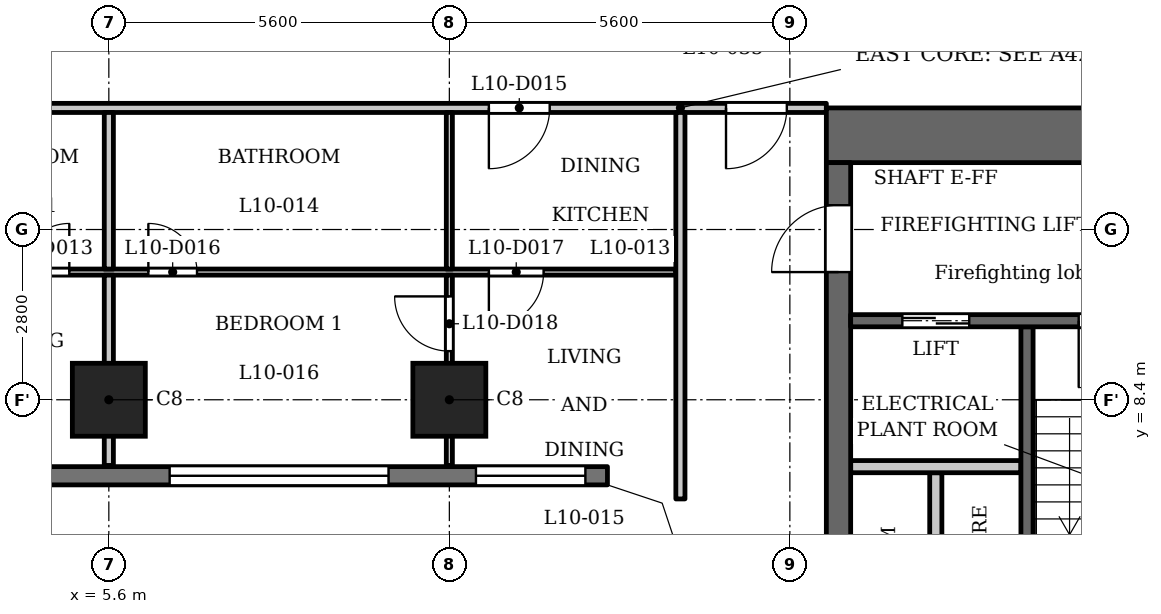
"""IFC4 building model, lengths in metres.
Left out: names, types, materials, properties, quantities, classifications, styles, units other than length and angle.
Written with IfcOpenShell. Run it as: python <this file> out.ifc"""

import sys

from ifc_helpers import new_model, si_unit, direction, frame, frame_2d, origin, origin_2d, place, context, subcontext, project, spatial, polyline, rectangle, outline, extrude, element, fill, save


model = new_model("IFC4")
c1 = context("Model", 3, precision=1e-05, world=origin(), true_north=direction((0.0, 1.0)))
c2 = subcontext(c1, "Body", "Model", "MODEL_VIEW")
j1 = project(units=[si_unit("LENGTHUNIT", "METRE"), si_unit("PLANEANGLEUNIT", "RADIAN")], contexts=[c1])
p1 = place(None, origin())
s1 = spatial("IfcSite", under=j1, at=p1, CompositionType="ELEMENT")
p2 = place(p1, origin())
s2 = spatial("IfcBuilding", under=s1, at=p2, CompositionType="ELEMENT")
p3 = place(p2, frame((0.0, 0.0, 44.5)))
s3 = spatial("IfcBuildingStorey", under=s2, at=p3, CompositionType="ELEMENT", Elevation=44.5)
for number, where, z_axis, x_axis in (
    (1, (5.6, 8.4, 0.0), (0.0, 0.0, 1.0), (1.0, 0.0, 0.0)),
    (2, (11.2, 8.4, 0.0), (0.0, 0.0, 1.0), (1.0, 0.0, 0.0)),
):
    element("IfcColumn", number, at=place(p3, frame(where, z_axis=z_axis, x_axis=x_axis)), inside=s3, PredefinedType="COLUMN", context=c2, shape_type="SweptSolid", body=[
        extrude(rectangle(XDim=1.2, YDim=1.2, at=origin_2d()), origin(), (0.0, 0.0, 1.0), 3.5),
    ])
p4 = place(p3, frame((-13.8, 7.15, 0.0), z_axis=(0.0, 0.0, 1.0), x_axis=(1.0, 0.0, 0.0)))
e3 = element("IfcWall", 3, at=p4, inside=s3, PredefinedType="SOLIDWALL", context=c2, shape_type="SweptSolid", body=[
    extrude(rectangle(XDim=27.6, YDim=0.3, at=frame_2d((13.8, 0.0))), origin(), (0.0, 0.0, 1.0), 3.2),
])
p5 = place(p4, frame((0.363, 0.0, 0.9)))
e4 = element("IfcOpeningElement", 4, at=p5, cuts=e3, PredefinedType="OPENING", context=c2, shape_type="SweptSolid", body=[
    extrude(rectangle(XDim=1.8, YDim=1.25, at=frame_2d((0.9, 0.625))), frame((0.0, 0.16, 0.0), z_axis=(0.0, -1.0, 0.0), x_axis=(1.0, 0.0, 0.0)), (0.0, 0.0, 1.0), 0.32),
])
p6 = place(p4, frame((3.6, 0.0, 1.2)))
e5 = element("IfcOpeningElement", 5, at=p6, cuts=e3, PredefinedType="OPENING", context=c2, shape_type="SweptSolid", body=[
    extrude(rectangle(XDim=3.6, YDim=0.95, at=frame_2d((1.8, 0.475))), frame((0.0, 0.16, 0.0), z_axis=(0.0, -1.0, 0.0), x_axis=(1.0, 0.0, 0.0)), (0.0, 0.0, 1.0), 0.32),
])
p7 = place(p4, frame((9.2, 0.0, 1.2)))
e6 = element("IfcOpeningElement", 6, at=p7, cuts=e3, PredefinedType="OPENING", context=c2, shape_type="SweptSolid", body=[
    extrude(rectangle(XDim=3.6, YDim=0.95, at=frame_2d((1.8, 0.475))), frame((0.0, 0.16, 0.0), z_axis=(0.0, -1.0, 0.0), x_axis=(1.0, 0.0, 0.0)), (0.0, 0.0, 1.0), 0.32),
])
p8 = place(p4, frame((14.8, 0.0, 1.2)))
e7 = element("IfcOpeningElement", 7, at=p8, cuts=e3, PredefinedType="OPENING", context=c2, shape_type="SweptSolid", body=[
    extrude(rectangle(XDim=3.6, YDim=0.95, at=frame_2d((1.8, 0.475))), frame((0.0, 0.16, 0.0), z_axis=(0.0, -1.0, 0.0), x_axis=(1.0, 0.0, 0.0)), (0.0, 0.0, 1.0), 0.32),
])
p9 = place(p4, frame((20.4, 0.0, 1.2)))
e8 = element("IfcOpeningElement", 8, at=p9, cuts=e3, PredefinedType="OPENING", context=c2, shape_type="SweptSolid", body=[
    extrude(rectangle(XDim=3.6, YDim=0.95, at=frame_2d((1.8, 0.475))), frame((0.0, 0.16, 0.0), z_axis=(0.0, -1.0, 0.0), x_axis=(1.0, 0.0, 0.0)), (0.0, 0.0, 1.0), 0.32),
])
p10 = place(p4, frame((25.438, 0.0, 0.9)))
e9 = element("IfcOpeningElement", 9, at=p10, cuts=e3, PredefinedType="OPENING", context=c2, shape_type="SweptSolid", body=[
    extrude(rectangle(XDim=1.8, YDim=1.25, at=frame_2d((0.9, 0.625))), frame((0.0, 0.16, 0.0), z_axis=(0.0, -1.0, 0.0), x_axis=(1.0, 0.0, 0.0)), (0.0, 0.0, 1.0), 0.32),
])
p11 = place(p3, frame((20.7, 2.6, 0.0), z_axis=(0.0, 0.0, 1.0), x_axis=(0.0, 1.0, 0.0)))
e10 = element("IfcWall", 10, at=p11, inside=s3, PredefinedType="SHEAR", context=c2, shape_type="SweptSolid", body=[
    extrude(rectangle(XDim=7.0, YDim=0.2, at=frame_2d((3.5, 0.0))), origin(), (0.0, 0.0, 1.0), 3.2),
])
p12 = place(p3, frame((17.4, 12.75, 0.0), z_axis=(0.0, 0.0, 1.0), x_axis=(1.0, 0.0, 0.0)))
e11 = element("IfcWall", 11, at=p12, inside=s3, PredefinedType="SHEAR", context=c2, shape_type="SweptSolid", body=[
    extrude(rectangle(XDim=10.4, YDim=0.9, at=frame_2d((5.2, 0.0))), origin(), (0.0, 0.0, 1.0), 3.2),
])
p13 = place(p3, frame((19.2, 2.6, 0.0), z_axis=(0.0, 0.0, 1.0), x_axis=(0.0, 1.0, 0.0)))
e12 = element("IfcWall", 12, at=p13, inside=s3, PredefinedType="PARTITIONING", context=c2, shape_type="SweptSolid", body=[
    extrude(rectangle(XDim=4.6, YDim=0.2, at=frame_2d((2.3, 0.0))), origin(), (0.0, 0.0, 1.0), 3.2),
])
p14 = place(p3, frame((17.6, -12.3, 0.0), z_axis=(0.0, 0.0, 1.0), x_axis=(0.0, 1.0, 0.0)))
e13 = element("IfcWall", 13, at=p14, inside=s3, PredefinedType="SHEAR", context=c2, shape_type="SweptSolid", body=[
    extrude(rectangle(XDim=24.6, YDim=0.4, at=frame_2d((12.3, 0.0))), origin(), (0.0, 0.0, 1.0), 3.2),
])
p15 = place(p14, frame((6.0, 0.0, 0.0)))
e14 = element("IfcOpeningElement", 14, at=p15, cuts=e13, PredefinedType="OPENING", context=c2, shape_type="SweptSolid", body=[
    extrude(rectangle(XDim=1.1, YDim=2.1, at=frame_2d((0.55, 1.05))), frame((0.0, 0.21, 0.0), z_axis=(0.0, -1.0, 0.0), x_axis=(1.0, 0.0, 0.0)), (0.0, 0.0, 1.0), 0.42),
])
p16 = place(p14, frame((8.4, 0.0, 0.0)))
e15 = element("IfcOpeningElement", 15, at=p16, cuts=e13, PredefinedType="OPENING", context=c2, shape_type="SweptSolid", body=[
    extrude(rectangle(XDim=1.1, YDim=2.1, at=frame_2d((0.55, 1.05))), frame((0.0, 0.21, 0.0), z_axis=(0.0, -1.0, 0.0), x_axis=(1.0, 0.0, 0.0)), (0.0, 0.0, 1.0), 0.42),
])
p17 = place(p14, frame((10.8, 0.0, 0.0)))
e16 = element("IfcOpeningElement", 16, at=p17, cuts=e13, PredefinedType="OPENING", context=c2, shape_type="SweptSolid", body=[
    extrude(rectangle(XDim=1.1, YDim=2.1, at=frame_2d((0.55, 1.05))), frame((0.0, 0.21, 0.0), z_axis=(0.0, -1.0, 0.0), x_axis=(1.0, 0.0, 0.0)), (0.0, 0.0, 1.0), 0.42),
])
p18 = place(p14, frame((16.75, 0.0, 0.0)))
e17 = element("IfcOpeningElement", 17, at=p18, cuts=e13, PredefinedType="OPENING", context=c2, shape_type="SweptSolid", body=[
    extrude(rectangle(XDim=0.9, YDim=2.1, at=frame_2d((0.45, 1.05))), frame((0.0, 0.21, 0.0), z_axis=(0.0, -1.0, 0.0), x_axis=(1.0, 0.0, 0.0)), (0.0, 0.0, 1.0), 0.42),
])
p19 = place(p14, frame((22.8, 0.0, 0.0)))
e18 = element("IfcOpeningElement", 18, at=p19, cuts=e13, PredefinedType="OPENING", context=c2, shape_type="SweptSolid", body=[
    extrude(rectangle(XDim=1.1, YDim=2.1, at=frame_2d((0.55, 1.05))), frame((0.0, 0.21, 0.0), z_axis=(0.0, -1.0, 0.0), x_axis=(1.0, 0.0, 0.0)), (0.0, 0.0, 1.0), 0.42),
])
p20 = place(p14, frame((0.7, 0.0, 0.0)))
e19 = element("IfcOpeningElement", 19, at=p20, cuts=e13, PredefinedType="OPENING", context=c2, shape_type="SweptSolid", body=[
    extrude(rectangle(XDim=1.1, YDim=2.1, at=frame_2d((0.55, 1.05))), frame((0.0, 0.21, 0.0), z_axis=(0.0, -1.0, 0.0), x_axis=(1.0, 0.0, 0.0)), (0.0, 0.0, 1.0), 0.42),
])
p21 = place(p14, frame((12.775, 0.0, 0.0)))
e20 = element("IfcOpeningElement", 20, at=p21, cuts=e13, PredefinedType="OPENING", context=c2, shape_type="SweptSolid", body=[
    extrude(rectangle(XDim=1.8, YDim=2.1, at=frame_2d((0.9, 1.05))), frame((0.0, 0.21, 0.0), z_axis=(0.0, -1.0, 0.0), x_axis=(1.0, 0.0, 0.0)), (0.0, 0.0, 1.0), 0.42),
])
p22 = place(p3, frame((17.8, 7.3, 0.0), z_axis=(0.0, 0.0, 1.0), x_axis=(1.0, 0.0, 0.0)))
e21 = element("IfcWall", 21, at=p22, inside=s3, PredefinedType="PARTITIONING", context=c2, shape_type="SweptSolid", body=[
    extrude(rectangle(XDim=2.8, YDim=0.2, at=frame_2d((1.4, 0.0))), origin(), (0.0, 0.0, 1.0), 3.2),
])
p23 = place(p3, frame((17.8, 9.7, 0.0), z_axis=(0.0, 0.0, 1.0), x_axis=(1.0, 0.0, 0.0)))
e22 = element("IfcWall", 22, at=p23, inside=s3, PredefinedType="SHEAR", context=c2, shape_type="SweptSolid", body=[
    extrude(rectangle(XDim=8.3, YDim=0.2, at=frame_2d((4.15, 0.0))), origin(), (0.0, 0.0, 1.0), 3.2),
])
p24 = place(p23, frame((0.85, 0.0, 0.0)))
e23 = element("IfcOpeningElement", 23, at=p24, cuts=e22, PredefinedType="OPENING", context=c2, shape_type="SweptSolid", body=[
    extrude(rectangle(XDim=1.1, YDim=2.1, at=frame_2d((0.55, 1.05))), frame((0.0, 0.11, 0.0), z_axis=(0.0, -1.0, 0.0), x_axis=(1.0, 0.0, 0.0)), (0.0, 0.0, 1.0), 0.22),
])
p25 = place(p23, frame((3.75, 0.0, 0.0)))
e24 = element("IfcOpeningElement", 24, at=p25, cuts=e22, PredefinedType="OPENING", context=c2, shape_type="SweptSolid", body=[
    extrude(rectangle(XDim=1.1, YDim=2.1, at=frame_2d((0.55, 1.05))), frame((0.0, 0.11, 0.0), z_axis=(0.0, -1.0, 0.0), x_axis=(1.0, 0.0, 0.0)), (0.0, 0.0, 1.0), 0.22),
])
p26 = place(p3, frame((-14.925, 10.5, 0.0), z_axis=(0.0, 0.0, 1.0), x_axis=(1.0, 0.0, 0.0)))
e25 = element("IfcWall", 25, at=p26, inside=s3, PredefinedType="PARTITIONING", context=c2, shape_type="SweptSolid", body=[
    extrude(rectangle(XDim=29.85, YDim=0.1, at=frame_2d((14.925, 0.0))), origin(), (0.0, 0.0, 1.0), 3.2),
])
p27 = place(p26, frame((4.375, 0.0, 0.0)))
e26 = element("IfcOpeningElement", 26, at=p27, cuts=e25, PredefinedType="OPENING", context=c2, shape_type="SweptSolid", body=[
    extrude(rectangle(XDim=0.8, YDim=2.1, at=frame_2d((0.4, 1.05))), frame((0.0, 0.06, 0.0), z_axis=(0.0, -1.0, 0.0), x_axis=(1.0, 0.0, 0.0)), (0.0, 0.0, 1.0), 0.12),
])
p28 = place(p26, frame((0.575, 0.0, 0.0)))
e27 = element("IfcOpeningElement", 27, at=p28, cuts=e25, PredefinedType="OPENING", context=c2, shape_type="SweptSolid", body=[
    extrude(rectangle(XDim=0.9, YDim=2.1, at=frame_2d((0.45, 1.05))), frame((0.0, 0.06, 0.0), z_axis=(0.0, -1.0, 0.0), x_axis=(1.0, 0.0, 0.0)), (0.0, 0.0, 1.0), 0.12),
])
p29 = place(p26, frame((13.475, 0.0, 0.0)))
e28 = element("IfcOpeningElement", 28, at=p29, cuts=e25, PredefinedType="OPENING", context=c2, shape_type="SweptSolid", body=[
    extrude(rectangle(XDim=0.8, YDim=2.1, at=frame_2d((0.4, 1.05))), frame((0.0, 0.06, 0.0), z_axis=(0.0, -1.0, 0.0), x_axis=(1.0, 0.0, 0.0)), (0.0, 0.0, 1.0), 0.12),
])
p30 = place(p26, frame((9.975, 0.0, 0.0)))
e29 = element("IfcOpeningElement", 29, at=p30, cuts=e25, PredefinedType="OPENING", context=c2, shape_type="SweptSolid", body=[
    extrude(rectangle(XDim=0.9, YDim=2.1, at=frame_2d((0.45, 1.05))), frame((0.0, 0.06, 0.0), z_axis=(0.0, -1.0, 0.0), x_axis=(1.0, 0.0, 0.0)), (0.0, 0.0, 1.0), 0.12),
])
p31 = place(p26, frame((19.075, 0.0, 0.0)))
e30 = element("IfcOpeningElement", 30, at=p31, cuts=e25, PredefinedType="OPENING", context=c2, shape_type="SweptSolid", body=[
    extrude(rectangle(XDim=0.8, YDim=2.1, at=frame_2d((0.4, 1.05))), frame((0.0, 0.06, 0.0), z_axis=(0.0, -1.0, 0.0), x_axis=(1.0, 0.0, 0.0)), (0.0, 0.0, 1.0), 0.12),
])
p32 = place(p26, frame((16.075, 0.0, 0.0)))
e31 = element("IfcOpeningElement", 31, at=p32, cuts=e25, PredefinedType="OPENING", context=c2, shape_type="SweptSolid", body=[
    extrude(rectangle(XDim=0.9, YDim=2.1, at=frame_2d((0.45, 1.05))), frame((0.0, 0.06, 0.0), z_axis=(0.0, -1.0, 0.0), x_axis=(1.0, 0.0, 0.0)), (0.0, 0.0, 1.0), 0.12),
])
p33 = place(p26, frame((21.175, 0.0, 0.0)))
e32 = element("IfcOpeningElement", 32, at=p33, cuts=e25, PredefinedType="OPENING", context=c2, shape_type="SweptSolid", body=[
    extrude(rectangle(XDim=0.8, YDim=2.1, at=frame_2d((0.4, 1.05))), frame((0.0, 0.06, 0.0), z_axis=(0.0, -1.0, 0.0), x_axis=(1.0, 0.0, 0.0)), (0.0, 0.0, 1.0), 0.12),
])
p34 = place(p26, frame((26.775, 0.0, 0.0)))
e33 = element("IfcOpeningElement", 33, at=p34, cuts=e25, PredefinedType="OPENING", context=c2, shape_type="SweptSolid", body=[
    extrude(rectangle(XDim=0.9, YDim=2.1, at=frame_2d((0.45, 1.05))), frame((0.0, 0.06, 0.0), z_axis=(0.0, -1.0, 0.0), x_axis=(1.0, 0.0, 0.0)), (0.0, 0.0, 1.0), 0.12),
])
p35 = place(p3, frame((-17.4, 13.2, 0.0), z_axis=(0.0, 0.0, 1.0), x_axis=(1.0, 0.0, 0.0)))
e34 = element("IfcWall", 34, at=p35, inside=s3, PredefinedType="PARTITIONING", context=c2, shape_type="SweptSolid", body=[
    extrude(rectangle(XDim=34.8, YDim=0.15, at=frame_2d((17.4, 0.0))), origin(), (0.0, 0.0, 1.0), 3.2),
])
p36 = place(p35, frame((0.75, 0.0, 0.0)))
e35 = element("IfcOpeningElement", 35, at=p36, cuts=e34, PredefinedType="OPENING", context=c2, shape_type="SweptSolid", body=[
    extrude(rectangle(XDim=1.0, YDim=2.1, at=frame_2d((0.5, 1.05))), frame((0.0, 0.085, 0.0), z_axis=(0.0, -1.0, 0.0), x_axis=(1.0, 0.0, 0.0)), (0.0, 0.0, 1.0), 0.17),
])
p37 = place(p35, frame((33.15, 0.0, 0.0)))
e36 = element("IfcOpeningElement", 36, at=p37, cuts=e34, PredefinedType="OPENING", context=c2, shape_type="SweptSolid", body=[
    extrude(rectangle(XDim=1.0, YDim=2.1, at=frame_2d((0.5, 1.05))), frame((0.0, 0.085, 0.0), z_axis=(0.0, -1.0, 0.0), x_axis=(1.0, 0.0, 0.0)), (0.0, 0.0, 1.0), 0.17),
])
p38 = place(p35, frame((3.05, 0.0, 0.0)))
e37 = element("IfcOpeningElement", 37, at=p38, cuts=e34, PredefinedType="OPENING", context=c2, shape_type="SweptSolid", body=[
    extrude(rectangle(XDim=1.0, YDim=2.1, at=frame_2d((0.5, 1.05))), frame((0.0, 0.085, 0.0), z_axis=(0.0, -1.0, 0.0), x_axis=(1.0, 0.0, 0.0)), (0.0, 0.0, 1.0), 0.17),
])
p39 = place(p35, frame((12.45, 0.0, 0.0)))
e38 = element("IfcOpeningElement", 38, at=p39, cuts=e34, PredefinedType="OPENING", context=c2, shape_type="SweptSolid", body=[
    extrude(rectangle(XDim=1.0, YDim=2.1, at=frame_2d((0.5, 1.05))), frame((0.0, 0.085, 0.0), z_axis=(0.0, -1.0, 0.0), x_axis=(1.0, 0.0, 0.0)), (0.0, 0.0, 1.0), 0.17),
])
p40 = place(p35, frame((18.3, 0.0, 0.0)))
e39 = element("IfcOpeningElement", 39, at=p40, cuts=e34, PredefinedType="OPENING", context=c2, shape_type="SweptSolid", body=[
    extrude(rectangle(XDim=1.0, YDim=2.1, at=frame_2d((0.5, 1.05))), frame((0.0, 0.085, 0.0), z_axis=(0.0, -1.0, 0.0), x_axis=(1.0, 0.0, 0.0)), (0.0, 0.0, 1.0), 0.17),
])
p41 = place(p35, frame((29.25, 0.0, 0.0)))
e40 = element("IfcOpeningElement", 40, at=p41, cuts=e34, PredefinedType="OPENING", context=c2, shape_type="SweptSolid", body=[
    extrude(rectangle(XDim=1.0, YDim=2.1, at=frame_2d((0.5, 1.05))), frame((0.0, 0.085, 0.0), z_axis=(0.0, -1.0, 0.0), x_axis=(1.0, 0.0, 0.0)), (0.0, 0.0, 1.0), 0.17),
])
p42 = place(p3, frame((5.6, 7.32, 0.0), z_axis=(0.0, 0.0, 1.0), x_axis=(0.0, 1.0, 0.0)))
e41 = element("IfcWall", 41, at=p42, inside=s3, PredefinedType="PARTITIONING", context=c2, shape_type="SweptSolid", body=[
    extrude(rectangle(XDim=3.13, YDim=0.15, at=frame_2d((1.565, 0.0))), origin(), (0.0, 0.0, 1.0), 3.2),
])
p43 = place(p3, frame((5.6, 10.55, 0.0), z_axis=(0.0, 0.0, 1.0), x_axis=(0.0, 1.0, 0.0)))
e42 = element("IfcWall", 42, at=p43, inside=s3, PredefinedType="PARTITIONING", context=c2, shape_type="SweptSolid", body=[
    extrude(rectangle(XDim=2.575, YDim=0.15, at=frame_2d((1.288, 0.0))), origin(), (0.0, 0.0, 1.0), 3.2),
])
p44 = place(p3, frame((11.2, 7.32, 0.0), z_axis=(0.0, 0.0, 1.0), x_axis=(0.0, 1.0, 0.0)))
e43 = element("IfcWall", 43, at=p44, inside=s3, PredefinedType="PARTITIONING", context=c2, shape_type="SweptSolid", body=[
    extrude(rectangle(XDim=3.13, YDim=0.1, at=frame_2d((1.565, 0.0))), origin(), (0.0, 0.0, 1.0), 3.2),
])
p45 = place(p44, frame((1.88, 0.0, 0.0)))
e44 = element("IfcOpeningElement", 44, at=p45, cuts=e43, PredefinedType="OPENING", context=c2, shape_type="SweptSolid", body=[
    extrude(rectangle(XDim=0.9, YDim=2.1, at=frame_2d((0.45, 1.05))), frame((0.0, 0.06, 0.0), z_axis=(0.0, -1.0, 0.0), x_axis=(1.0, 0.0, 0.0)), (0.0, 0.0, 1.0), 0.12),
])
p46 = place(p3, frame((11.2, 10.55, 0.0), z_axis=(0.0, 0.0, 1.0), x_axis=(0.0, 1.0, 0.0)))
e45 = element("IfcWall", 45, at=p46, inside=s3, PredefinedType="PARTITIONING", context=c2, shape_type="SweptSolid", body=[
    extrude(rectangle(XDim=2.575, YDim=0.1, at=frame_2d((1.288, 0.0))), origin(), (0.0, 0.0, 1.0), 3.2),
])
p47 = place(p3, frame((15.0, 6.769, 0.0), z_axis=(0.0, 0.0, 1.0), x_axis=(0.0, 1.0, 0.0)))
e46 = element("IfcWall", 46, at=p47, inside=s3, PredefinedType="PARTITIONING", context=c2, shape_type="SweptSolid", body=[
    extrude(rectangle(XDim=6.356, YDim=0.15, at=frame_2d((3.178, 0.0))), origin(), (0.0, 0.0, 1.0), 3.2),
])
p48 = place(p3, origin())
e47 = element("IfcWall", 47, at=p48, inside=s3, PredefinedType="SOLIDWALL", context=c2, shape_type="SweptSolid", body=[
    extrude(outline(polyline([(14.937, 6.937), (13.849, 7.3), (13.8, 7.3), (13.8, 7.0), (14.7, 6.7), (15.0, 5.8), (15.3, 5.8), (15.3, 5.849), (14.937, 6.937)])), origin(), (0.0, 0.0, 1.0), 3.2),
])
p49 = place(p24, origin())
e48 = element("IfcDoor", 48, at=p49, inside=s3, OperationType="DOUBLE_DOOR_SLIDING", PredefinedType="DOOR", context=c2, shape_type="SweptSolid", body=[
    extrude(rectangle(XDim=1.1, YDim=2.1, at=frame_2d((0.55, 1.05))), frame((0.0, 0.025, 0.0), z_axis=(0.0, -1.0, 0.0), x_axis=(1.0, 0.0, 0.0)), (0.0, 0.0, 1.0), 0.05),
])
fill(e23, e48)
p50 = place(p19, origin())
e49 = element("IfcDoor", 49, at=p50, inside=s3, OperationType="SINGLE_SWING_RIGHT", PredefinedType="DOOR", context=c2, shape_type="SweptSolid", body=[
    extrude(rectangle(XDim=1.1, YDim=2.1, at=frame_2d((0.55, 1.05))), frame((0.0, 0.025, 0.0), z_axis=(0.0, -1.0, 0.0), x_axis=(1.0, 0.0, 0.0)), (0.0, 0.0, 1.0), 0.05),
])
fill(e18, e49)
p51 = place(p25, origin())
e50 = element("IfcDoor", 50, at=p51, inside=s3, OperationType="SINGLE_SWING_LEFT", PredefinedType="DOOR", context=c2, shape_type="SweptSolid", body=[
    extrude(rectangle(XDim=1.1, YDim=2.1, at=frame_2d((0.55, 1.05))), frame((0.0, 0.025, 0.0), z_axis=(0.0, -1.0, 0.0), x_axis=(1.0, 0.0, 0.0)), (0.0, 0.0, 1.0), 0.05),
])
fill(e24, e50)
p52 = place(p37, origin())
e51 = element("IfcDoor", 51, at=p52, inside=s3, OperationType="SINGLE_SWING_LEFT", PredefinedType="DOOR", context=c2, shape_type="SweptSolid", body=[
    extrude(rectangle(XDim=1.0, YDim=2.1, at=frame_2d((0.5, 1.05))), frame((0.0, 0.025, 0.0), z_axis=(0.0, -1.0, 0.0), x_axis=(1.0, 0.0, 0.0)), (0.0, 0.0, 1.0), 0.05),
])
fill(e36, e51)
p53 = place(p31, origin())
e52 = element("IfcDoor", 52, at=p53, inside=s3, OperationType="SINGLE_SWING_LEFT", PredefinedType="DOOR", context=c2, shape_type="SweptSolid", body=[
    extrude(rectangle(XDim=0.8, YDim=2.1, at=frame_2d((0.4, 1.05))), frame((0.0, 0.025, 0.0), z_axis=(0.0, -1.0, 0.0), x_axis=(1.0, 0.0, 0.0)), (0.0, 0.0, 1.0), 0.05),
])
fill(e30, e52)
p54 = place(p41, origin())
e53 = element("IfcDoor", 53, at=p54, inside=s3, OperationType="SINGLE_SWING_LEFT", PredefinedType="DOOR", context=c2, shape_type="SweptSolid", body=[
    extrude(rectangle(XDim=1.0, YDim=2.1, at=frame_2d((0.5, 1.05))), frame((0.0, 0.025, 0.0), z_axis=(0.0, -1.0, 0.0), x_axis=(1.0, 0.0, 0.0)), (0.0, 0.0, 1.0), 0.05),
])
fill(e40, e53)
p55 = place(p33, origin())
e54 = element("IfcDoor", 54, at=p55, inside=s3, OperationType="SINGLE_SWING_RIGHT", PredefinedType="DOOR", context=c2, shape_type="SweptSolid", body=[
    extrude(rectangle(XDim=0.8, YDim=2.1, at=frame_2d((0.4, 1.05))), frame((0.0, 0.025, 0.0), z_axis=(0.0, -1.0, 0.0), x_axis=(1.0, 0.0, 0.0)), (0.0, 0.0, 1.0), 0.05),
])
fill(e32, e54)
p56 = place(p34, origin())
e55 = element("IfcDoor", 55, at=p56, inside=s3, OperationType="SINGLE_SWING_LEFT", PredefinedType="DOOR", context=c2, shape_type="SweptSolid", body=[
    extrude(rectangle(XDim=0.9, YDim=2.1, at=frame_2d((0.45, 1.05))), frame((0.0, 0.025, 0.0), z_axis=(0.0, -1.0, 0.0), x_axis=(1.0, 0.0, 0.0)), (0.0, 0.0, 1.0), 0.05),
])
fill(e33, e55)
p57 = place(p45, origin())
e56 = element("IfcDoor", 56, at=p57, inside=s3, OperationType="SINGLE_SWING_LEFT", PredefinedType="DOOR", context=c2, shape_type="SweptSolid", body=[
    extrude(rectangle(XDim=0.9, YDim=2.1, at=frame_2d((0.45, 1.05))), frame((0.0, 0.025, 0.0), z_axis=(0.0, -1.0, 0.0), x_axis=(1.0, 0.0, 0.0)), (0.0, 0.0, 1.0), 0.05),
])
fill(e44, e56)
p58 = place(p9, origin())
e57 = element("IfcWindow", 57, at=p58, inside=s3, PartitioningType="SINGLE_PANEL", PredefinedType="WINDOW", context=c2, shape_type="SweptSolid", body=[
    extrude(rectangle(XDim=3.6, YDim=0.95, at=frame_2d((1.8, 0.475))), frame((0.0, 0.03, 0.0), z_axis=(0.0, -1.0, 0.0), x_axis=(1.0, 0.0, 0.0)), (0.0, 0.0, 1.0), 0.06),
])
fill(e8, e57)
p59 = place(p10, origin())
e58 = element("IfcWindow", 58, at=p59, inside=s3, PartitioningType="SINGLE_PANEL", PredefinedType="WINDOW", context=c2, shape_type="SweptSolid", body=[
    extrude(rectangle(XDim=1.8, YDim=1.25, at=frame_2d((0.9, 0.625))), frame((0.0, 0.03, 0.0), z_axis=(0.0, -1.0, 0.0), x_axis=(1.0, 0.0, 0.0)), (0.0, 0.0, 1.0), 0.06),
])
fill(e9, e58)
save(model, sys.argv[1])
